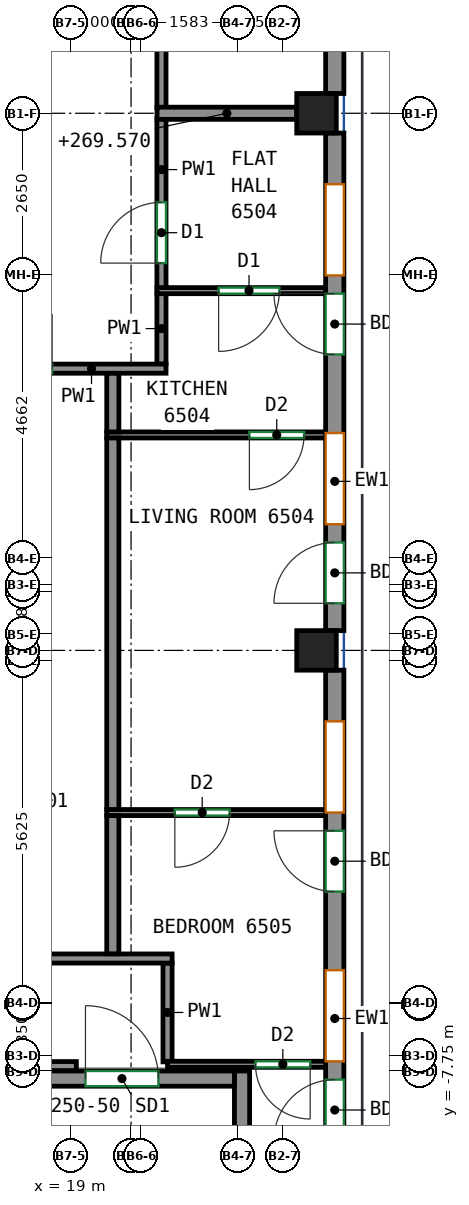
"""IFC4 building model, lengths in metres.
Left out: names, types, materials, properties, quantities, classifications, styles, units other than length and angle.
Written with IfcOpenShell. Run it as: python <this file> out.ifc"""

import sys

from ifc_helpers import new_model, si_unit, direction, frame, frame_2d, origin, origin_2d, place, context, subcontext, project, spatial, rectangle, extrude, source, transform, mapped, element, fill, save


model = new_model("IFC4")
c1 = context("Model", 3, precision=1e-05, world=origin(), true_north=direction((0.0, 1.0)))
c2 = subcontext(c1, "Body", "Model", "MODEL_VIEW")
j1 = project(units=[si_unit("LENGTHUNIT", "METRE"), si_unit("PLANEANGLEUNIT", "RADIAN")], contexts=[c1])
p1 = place(None, origin())
s1 = spatial("IfcSite", under=j1, at=p1, CompositionType="ELEMENT")
p2 = place(p1, origin())
s2 = spatial("IfcBuilding", under=s1, at=p2, CompositionType="ELEMENT")
p3 = place(p2, frame((0.0, 0.0, 267.0)))
s3 = spatial("IfcBuildingStorey", under=s2, at=p3, CompositionType="ELEMENT", Elevation=267.0)
m1 = source(origin(), c2, "Body", "SweptSolid", [
    extrude(rectangle(XDim=0.65, YDim=0.65, at=origin_2d()), origin(), (0.0, 0.0, 1.0), 3.12),
])
for number, where, z_axis, x_axis in (
    (1, (23.05, -0.833, 0.0), (0.0, 0.0, 1.0), (1.0, 0.0, 0.0)),
    (2, (23.05, 8.0, 0.0), (0.0, 0.0, 1.0), (1.0, 0.0, 0.0)),
):
    element("IfcColumn", number, at=place(p3, frame(where, z_axis=z_axis, x_axis=x_axis)), inside=s3, PredefinedType="COLUMN", context=c2, shape_type="MappedRepresentation", body=[
        mapped(m1, transform((0.0, 0.0, 0.0))),
    ])
m2 = source(origin(), c2, "Body", "SweptSolid", [
    extrude(rectangle(XDim=8.0, YDim=0.25, at=frame_2d((4.0, 0.0))), origin(), (0.0, 0.0, 1.0), 3.12),
])
p4 = place(p3, frame((21.825, -15.75, 0.0), z_axis=(0.0, 0.0, 1.0), x_axis=(0.0, 1.0, 0.0)))
e3 = element("IfcWall", 3, at=p4, inside=s3, PredefinedType="SHEAR", context=c2, shape_type="MappedRepresentation", body=[
    mapped(m2, transform((0.0, 0.0, 0.0))),
])
m3 = source(origin(), c2, "Body", "SweptSolid", [
    extrude(rectangle(XDim=3.7, YDim=0.25, at=frame_2d((1.85, 0.0))), origin(), (0.0, 0.0, 1.0), 3.12),
])
p5 = place(p3, frame((18.0, -7.875, 0.0), z_axis=(0.0, 0.0, 1.0), x_axis=(1.0, 0.0, 0.0)))
e4 = element("IfcWall", 4, at=p5, inside=s3, PredefinedType="SHEAR", context=c2, shape_type="MappedRepresentation", body=[
    mapped(m3, transform((0.0, 0.0, 0.0))),
])
p6 = place(p5, frame((1.25, 0.0, 0.0)))
e5 = element("IfcOpeningElement", 5, at=p6, cuts=e4, PredefinedType="OPENING", context=c2, shape_type="SweptSolid", body=[
    extrude(rectangle(XDim=1.2, YDim=2.1, at=frame_2d((0.6, 1.05))), frame((0.0, 0.135, 0.0), z_axis=(0.0, -1.0, 0.0), x_axis=(1.0, 0.0, 0.0)), (0.0, 0.0, 1.0), 0.27),
])
m4 = source(origin(), c2, "Body", "SweptSolid", [
    extrude(rectangle(XDim=8.184, YDim=0.3, at=frame_2d((4.092, 0.0))), origin(), (0.0, 0.0, 1.0), 3.12),
])
p7 = place(p3, frame((23.35, -9.342, 0.0), z_axis=(0.0, 0.0, 1.0), x_axis=(0.0, 1.0, 0.0)))
e6 = element("IfcWall", 6, at=p7, inside=s3, PredefinedType="SOLIDWALL", context=c2, shape_type="MappedRepresentation", body=[
    mapped(m4, transform((0.0, 0.0, 0.0))),
])
p8 = place(p7, frame((1.75, 0.0, 0.8)))
e7 = element("IfcOpeningElement", 7, at=p8, cuts=e6, PredefinedType="OPENING", context=c2, shape_type="SweptSolid", body=[
    extrude(rectangle(XDim=1.5, YDim=2.05, at=frame_2d((0.75, 1.025))), frame((0.0, 0.16, 0.0), z_axis=(0.0, -1.0, 0.0), x_axis=(1.0, 0.0, 0.0)), (0.0, 0.0, 1.0), 0.32),
])
p9 = place(p7, frame((0.45, 0.0, 0.0)))
e8 = element("IfcOpeningElement", 8, at=p9, cuts=e6, PredefinedType="OPENING", context=c2, shape_type="SweptSolid", body=[
    extrude(rectangle(XDim=1.0, YDim=2.1, at=frame_2d((0.5, 1.05))), frame((0.0, 0.16, 0.0), z_axis=(0.0, -1.0, 0.0), x_axis=(1.0, 0.0, 0.0)), (0.0, 0.0, 1.0), 0.32),
])
p10 = place(p7, frame((5.842, 0.0, 0.8)))
e9 = element("IfcOpeningElement", 9, at=p10, cuts=e6, PredefinedType="OPENING", context=c2, shape_type="SweptSolid", body=[
    extrude(rectangle(XDim=1.5, YDim=2.05, at=frame_2d((0.75, 1.025))), frame((0.0, 0.16, 0.0), z_axis=(0.0, -1.0, 0.0), x_axis=(1.0, 0.0, 0.0)), (0.0, 0.0, 1.0), 0.32),
])
p11 = place(p7, frame((4.542, 0.0, 0.0)))
e10 = element("IfcOpeningElement", 10, at=p11, cuts=e6, PredefinedType="OPENING", context=c2, shape_type="SweptSolid", body=[
    extrude(rectangle(XDim=1.0, YDim=2.1, at=frame_2d((0.5, 1.05))), frame((0.0, 0.16, 0.0), z_axis=(0.0, -1.0, 0.0), x_axis=(1.0, 0.0, 0.0)), (0.0, 0.0, 1.0), 0.32),
])
m5 = source(origin(), c2, "Body", "SweptSolid", [
    extrude(rectangle(XDim=8.183, YDim=0.3, at=frame_2d((4.092, 0.0))), origin(), (0.0, 0.0, 1.0), 3.12),
])
p12 = place(p3, frame((23.35, -0.508, 0.0), z_axis=(0.0, 0.0, 1.0), x_axis=(0.0, 1.0, 0.0)))
e11 = element("IfcWall", 11, at=p12, inside=s3, PredefinedType="SOLIDWALL", context=c2, shape_type="MappedRepresentation", body=[
    mapped(m5, transform((0.0, 0.0, 0.0))),
])
p13 = place(p12, frame((1.75, 0.0, 0.8)))
e12 = element("IfcOpeningElement", 12, at=p13, cuts=e11, PredefinedType="OPENING", context=c2, shape_type="SweptSolid", body=[
    extrude(rectangle(XDim=1.5, YDim=2.05, at=frame_2d((0.75, 1.025))), frame((0.0, 0.16, 0.0), z_axis=(0.0, -1.0, 0.0), x_axis=(1.0, 0.0, 0.0)), (0.0, 0.0, 1.0), 0.32),
])
p14 = place(p12, frame((0.45, 0.0, 0.0)))
e13 = element("IfcOpeningElement", 13, at=p14, cuts=e11, PredefinedType="OPENING", context=c2, shape_type="SweptSolid", body=[
    extrude(rectangle(XDim=1.0, YDim=2.1, at=frame_2d((0.5, 1.05))), frame((0.0, 0.16, 0.0), z_axis=(0.0, -1.0, 0.0), x_axis=(1.0, 0.0, 0.0)), (0.0, 0.0, 1.0), 0.32),
])
p15 = place(p12, frame((5.842, 0.0, 0.8)))
e14 = element("IfcOpeningElement", 14, at=p15, cuts=e11, PredefinedType="OPENING", context=c2, shape_type="SweptSolid", body=[
    extrude(rectangle(XDim=1.5, YDim=2.05, at=frame_2d((0.75, 1.025))), frame((0.0, 0.16, 0.0), z_axis=(0.0, -1.0, 0.0), x_axis=(1.0, 0.0, 0.0)), (0.0, 0.0, 1.0), 0.32),
])
p16 = place(p12, frame((4.542, 0.0, 0.0)))
e15 = element("IfcOpeningElement", 15, at=p16, cuts=e11, PredefinedType="OPENING", context=c2, shape_type="SweptSolid", body=[
    extrude(rectangle(XDim=1.0, YDim=2.1, at=frame_2d((0.5, 1.05))), frame((0.0, 0.16, 0.0), z_axis=(0.0, -1.0, 0.0), x_axis=(1.0, 0.0, 0.0)), (0.0, 0.0, 1.0), 0.32),
])
m6 = source(origin(), c2, "Body", "SweptSolid", [
    extrude(rectangle(XDim=13.35, YDim=0.3, at=frame_2d((6.675, 0.0))), origin(), (0.0, 0.0, 1.0), 3.12),
])
p17 = place(p3, frame((23.35, 8.325, 0.0), z_axis=(0.0, 0.0, 1.0), x_axis=(0.0, 1.0, 0.0)))
e16 = element("IfcWall", 16, at=p17, inside=s3, PredefinedType="SOLIDWALL", context=c2, shape_type="MappedRepresentation", body=[
    mapped(m6, transform((0.0, 0.0, 0.0))),
])
p18 = place(p17, frame((0.919, 0.0, 0.8)))
e17 = element("IfcOpeningElement", 17, at=p18, cuts=e16, PredefinedType="OPENING", context=c2, shape_type="SweptSolid", body=[
    extrude(rectangle(XDim=1.5, YDim=2.05, at=frame_2d((0.75, 1.025))), frame((0.0, 0.16, 0.0), z_axis=(0.0, -1.0, 0.0), x_axis=(1.0, 0.0, 0.0)), (0.0, 0.0, 1.0), 0.32),
])
p19 = place(p17, frame((4.256, 0.0, 0.8)))
e18 = element("IfcOpeningElement", 18, at=p19, cuts=e16, PredefinedType="OPENING", context=c2, shape_type="SweptSolid", body=[
    extrude(rectangle(XDim=1.5, YDim=2.05, at=frame_2d((0.75, 1.025))), frame((0.0, 0.16, 0.0), z_axis=(0.0, -1.0, 0.0), x_axis=(1.0, 0.0, 0.0)), (0.0, 0.0, 1.0), 0.32),
])
p20 = place(p17, frame((7.594, 0.0, 0.8)))
e19 = element("IfcOpeningElement", 19, at=p20, cuts=e16, PredefinedType="OPENING", context=c2, shape_type="SweptSolid", body=[
    extrude(rectangle(XDim=1.5, YDim=2.05, at=frame_2d((0.75, 1.025))), frame((0.0, 0.16, 0.0), z_axis=(0.0, -1.0, 0.0), x_axis=(1.0, 0.0, 0.0)), (0.0, 0.0, 1.0), 0.32),
])
p21 = place(p17, frame((10.931, 0.0, 0.8)))
e20 = element("IfcOpeningElement", 20, at=p21, cuts=e16, PredefinedType="OPENING", context=c2, shape_type="SweptSolid", body=[
    extrude(rectangle(XDim=1.5, YDim=2.05, at=frame_2d((0.75, 1.025))), frame((0.0, 0.16, 0.0), z_axis=(0.0, -1.0, 0.0), x_axis=(1.0, 0.0, 0.0)), (0.0, 0.0, 1.0), 0.32),
])
p22 = place(p3, frame((15.23, -7.67, 0.0), z_axis=(0.0, 0.0, 1.0), x_axis=(1.0, 0.0, 0.0)))
e21 = element("IfcWall", 21, at=p22, inside=s3, PredefinedType="PARTITIONING", context=c2, shape_type="SweptSolid", body=[
    extrude(rectangle(XDim=3.87, YDim=0.15, at=frame_2d((1.935, 0.0))), origin(), (0.0, 0.0, 1.0), 3.12),
])
p23 = place(p3, frame((20.6, -7.6, 0.0), z_axis=(0.0, 0.0, 1.0), x_axis=(0.0, 1.0, 0.0)))
e22 = element("IfcWall", 22, at=p23, inside=s3, PredefinedType="PARTITIONING", context=c2, shape_type="SweptSolid", body=[
    extrude(rectangle(XDim=1.625, YDim=0.15, at=frame_2d((0.812, 0.0))), origin(), (0.0, 0.0, 1.0), 3.12),
])
p24 = place(p3, frame((20.5, 3.875, 0.0), z_axis=(0.0, 0.0, 1.0), x_axis=(0.0, 1.0, 0.0)))
e23 = element("IfcWall", 23, at=p24, inside=s3, PredefinedType="PARTITIONING", context=c2, shape_type="SweptSolid", body=[
    extrude(rectangle(XDim=1.168, YDim=0.15, at=frame_2d((0.584, 0.0))), origin(), (0.0, 0.0, 1.0), 3.12),
])
p25 = place(p3, frame((20.5, 5.123, 0.0), z_axis=(0.0, 0.0, 1.0), x_axis=(0.0, 1.0, 0.0)))
e24 = element("IfcWall", 24, at=p25, inside=s3, PredefinedType="PARTITIONING", context=c2, shape_type="SweptSolid", body=[
    extrude(rectangle(XDim=2.787, YDim=0.15, at=frame_2d((1.394, 0.0))), origin(), (0.0, 0.0, 1.0), 3.12),
])
p26 = place(p25, frame((0.413, 0.0, 0.0)))
e25 = element("IfcOpeningElement", 25, at=p26, cuts=e24, PredefinedType="OPENING", context=c2, shape_type="SweptSolid", body=[
    extrude(rectangle(XDim=1.0, YDim=2.1, at=frame_2d((0.5, 1.05))), frame((0.0, 0.085, 0.0), z_axis=(0.0, -1.0, 0.0), x_axis=(1.0, 0.0, 0.0)), (0.0, 0.0, 1.0), 0.17),
])
p27 = place(p3, frame((20.5, 8.09, 0.0), z_axis=(0.0, 0.0, 1.0), x_axis=(0.0, 1.0, 0.0)))
e26 = element("IfcWall", 26, at=p27, inside=s3, PredefinedType="PARTITIONING", context=c2, shape_type="SweptSolid", body=[
    extrude(rectangle(XDim=15.01, YDim=0.15, at=frame_2d((7.505, 0.0))), origin(), (0.0, 0.0, 1.0), 3.12),
])
p28 = place(p27, frame((7.505, 0.0, 0.0)))
e27 = element("IfcOpeningElement", 27, at=p28, cuts=e26, PredefinedType="OPENING", context=c2, shape_type="SweptSolid", body=[
    extrude(rectangle(XDim=0.9, YDim=2.1, at=frame_2d((0.45, 1.05))), frame((0.0, 0.085, 0.0), z_axis=(0.0, -1.0, 0.0), x_axis=(1.0, 0.0, 0.0)), (0.0, 0.0, 1.0), 0.17),
])
p29 = place(p3, frame((8.305, -5.9, 0.0), z_axis=(0.0, 0.0, 1.0), x_axis=(1.0, 0.0, 0.0)))
e28 = element("IfcWall", 28, at=p29, inside=s3, PredefinedType="PARTITIONING", context=c2, shape_type="SweptSolid", body=[
    extrude(rectangle(XDim=12.37, YDim=0.15, at=frame_2d((6.185, 0.0))), origin(), (0.0, 0.0, 1.0), 3.12),
])
p30 = place(p29, frame((6.004, 0.0, 0.0)))
e29 = element("IfcOpeningElement", 29, at=p30, cuts=e28, PredefinedType="OPENING", context=c2, shape_type="SweptSolid", body=[
    extrude(rectangle(XDim=0.9, YDim=2.1, at=frame_2d((0.45, 1.05))), frame((0.0, 0.085, 0.0), z_axis=(0.0, -1.0, 0.0), x_axis=(1.0, 0.0, 0.0)), (0.0, 0.0, 1.0), 0.17),
])
p31 = place(p3, frame((16.49, 3.8, 0.0), z_axis=(0.0, 0.0, 1.0), x_axis=(1.0, 0.0, 0.0)))
e30 = element("IfcWall", 30, at=p31, inside=s3, PredefinedType="PARTITIONING", context=c2, shape_type="SweptSolid", body=[
    extrude(rectangle(XDim=4.085, YDim=0.15, at=frame_2d((2.042, 0.0))), origin(), (0.0, 0.0, 1.0), 3.12),
])
p32 = place(p31, frame((1.312, 0.0, 0.0)))
e31 = element("IfcOpeningElement", 31, at=p32, cuts=e30, PredefinedType="OPENING", context=c2, shape_type="SweptSolid", body=[
    extrude(rectangle(XDim=0.9, YDim=2.1, at=frame_2d((0.45, 1.05))), frame((0.0, 0.085, 0.0), z_axis=(0.0, -1.0, 0.0), x_axis=(1.0, 0.0, 0.0)), (0.0, 0.0, 1.0), 0.17),
])
p33 = place(p3, frame((23.25, -7.64, 0.0), z_axis=(0.0, 0.0, 1.0), x_axis=(-1.0, 0.0, 0.0)))
e32 = element("IfcWall", 32, at=p33, inside=s3, PredefinedType="PARTITIONING", context=c2, shape_type="SweptSolid", body=[
    extrude(rectangle(XDim=2.65, YDim=0.1, at=frame_2d((1.325, 0.0))), origin(), (0.0, 0.0, 1.0), 3.12),
])
p34 = place(p33, frame((0.304, 0.0, 0.0)))
e33 = element("IfcOpeningElement", 33, at=p34, cuts=e32, PredefinedType="OPENING", context=c2, shape_type="SweptSolid", body=[
    extrude(rectangle(XDim=0.9, YDim=2.1, at=frame_2d((0.45, 1.05))), frame((0.0, 0.06, 0.0), z_axis=(0.0, -1.0, 0.0), x_axis=(1.0, 0.0, 0.0)), (0.0, 0.0, 1.0), 0.12),
])
p35 = place(p3, frame((23.25, -3.5, 0.0), z_axis=(0.0, 0.0, 1.0), x_axis=(-1.0, 0.0, 0.0)))
e34 = element("IfcWall", 34, at=p35, inside=s3, PredefinedType="PARTITIONING", context=c2, shape_type="SweptSolid", body=[
    extrude(rectangle(XDim=3.65, YDim=0.1, at=frame_2d((1.825, 0.0))), origin(), (0.0, 0.0, 1.0), 3.12),
])
p36 = place(p35, frame((1.63, 0.0, 0.0)))
e35 = element("IfcOpeningElement", 35, at=p36, cuts=e34, PredefinedType="OPENING", context=c2, shape_type="SweptSolid", body=[
    extrude(rectangle(XDim=0.9, YDim=2.1, at=frame_2d((0.45, 1.05))), frame((0.0, 0.06, 0.0), z_axis=(0.0, -1.0, 0.0), x_axis=(1.0, 0.0, 0.0)), (0.0, 0.0, 1.0), 0.12),
])
p37 = place(p3, frame((19.7, -5.823, 0.0), z_axis=(0.0, 0.0, 1.0), x_axis=(0.0, 1.0, 0.0)))
e36 = element("IfcWall", 36, at=p37, inside=s3, PredefinedType="PARTITIONING", context=c2, shape_type="SweptSolid", body=[
    extrude(rectangle(XDim=2.273, YDim=0.2, at=frame_2d((1.136, 0.0))), origin(), (0.0, 0.0, 1.0), 3.12),
])
p38 = place(p3, frame((23.25, 2.71, 0.0), z_axis=(0.0, 0.0, 1.0), x_axis=(-1.0, 0.0, 0.0)))
e37 = element("IfcWall", 37, at=p38, inside=s3, PredefinedType="PARTITIONING", context=c2, shape_type="SweptSolid", body=[
    extrude(rectangle(XDim=3.65, YDim=0.1, at=frame_2d((1.825, 0.0))), origin(), (0.0, 0.0, 1.0), 3.12),
])
p39 = place(p38, frame((0.404, 0.0, 0.0)))
e38 = element("IfcOpeningElement", 38, at=p39, cuts=e37, PredefinedType="OPENING", context=c2, shape_type="SweptSolid", body=[
    extrude(rectangle(XDim=0.9, YDim=2.1, at=frame_2d((0.45, 1.05))), frame((0.0, 0.06, 0.0), z_axis=(0.0, -1.0, 0.0), x_axis=(1.0, 0.0, 0.0)), (0.0, 0.0, 1.0), 0.12),
])
p40 = place(p3, frame((19.7, -3.45, 0.0), z_axis=(0.0, 0.0, 1.0), x_axis=(0.0, 1.0, 0.0)))
e39 = element("IfcWall", 39, at=p40, inside=s3, PredefinedType="PARTITIONING", context=c2, shape_type="SweptSolid", body=[
    extrude(rectangle(XDim=6.11, YDim=0.2, at=frame_2d((3.055, 0.0))), origin(), (0.0, 0.0, 1.0), 3.12),
])
p41 = place(p3, frame((23.25, 5.083, 0.0), z_axis=(0.0, 0.0, 1.0), x_axis=(-1.0, 0.0, 0.0)))
e40 = element("IfcWall", 40, at=p41, inside=s3, PredefinedType="PARTITIONING", context=c2, shape_type="SweptSolid", body=[
    extrude(rectangle(XDim=2.823, YDim=0.1, at=frame_2d((1.412, 0.0))), origin(), (0.0, 0.0, 1.0), 3.12),
])
p42 = place(p41, frame((0.81, 0.0, 0.0)))
e41 = element("IfcOpeningElement", 41, at=p42, cuts=e40, PredefinedType="OPENING", context=c2, shape_type="SweptSolid", body=[
    extrude(rectangle(XDim=1.0, YDim=2.1, at=frame_2d((0.5, 1.05))), frame((0.0, 0.06, 0.0), z_axis=(0.0, -1.0, 0.0), x_axis=(1.0, 0.0, 0.0)), (0.0, 0.0, 1.0), 0.12),
])
p43 = place(p3, frame((19.7, 2.76, 0.0), z_axis=(0.0, 0.0, 1.0), x_axis=(0.0, 1.0, 0.0)))
e42 = element("IfcWall", 42, at=p43, inside=s3, PredefinedType="PARTITIONING", context=c2, shape_type="SweptSolid", body=[
    extrude(rectangle(XDim=0.963, YDim=0.2, at=frame_2d((0.481, 0.0))), origin(), (0.0, 0.0, 1.0), 3.12),
])
p44 = place(p3, frame((20.427, 8.0, 0.0), z_axis=(0.0, 0.0, 1.0), x_axis=(1.0, 0.0, 0.0)))
e43 = element("IfcWall", 43, at=p44, inside=s3, PredefinedType="PARTITIONING", context=c2, shape_type="SweptSolid", body=[
    extrude(rectangle(XDim=2.298, YDim=0.2, at=frame_2d((1.149, 0.0))), origin(), (0.0, 0.0, 1.0), 2.57),
])
p45 = place(p8, origin())
e44 = element("IfcWindow", 44, at=p45, inside=s3, PartitioningType="SINGLE_PANEL", PredefinedType="WINDOW", context=c2, shape_type="SweptSolid", body=[
    extrude(rectangle(XDim=1.5, YDim=2.05, at=frame_2d((0.75, 1.025))), frame((0.0, 0.03, 0.0), z_axis=(0.0, -1.0, 0.0), x_axis=(1.0, 0.0, 0.0)), (0.0, 0.0, 1.0), 0.06),
])
fill(e7, e44)
p46 = place(p9, origin())
e45 = element("IfcDoor", 45, at=p46, inside=s3, OperationType="SINGLE_SWING_LEFT", PredefinedType="DOOR", context=c2, shape_type="SweptSolid", body=[
    extrude(rectangle(XDim=1.0, YDim=2.1, at=frame_2d((0.5, 1.05))), frame((0.0, 0.025, 0.0), z_axis=(0.0, -1.0, 0.0), x_axis=(1.0, 0.0, 0.0)), (0.0, 0.0, 1.0), 0.05),
])
fill(e8, e45)
p47 = place(p10, origin())
e46 = element("IfcWindow", 46, at=p47, inside=s3, PartitioningType="SINGLE_PANEL", PredefinedType="WINDOW", context=c2, shape_type="SweptSolid", body=[
    extrude(rectangle(XDim=1.5, YDim=2.05, at=frame_2d((0.75, 1.025))), frame((0.0, 0.03, 0.0), z_axis=(0.0, -1.0, 0.0), x_axis=(1.0, 0.0, 0.0)), (0.0, 0.0, 1.0), 0.06),
])
fill(e9, e46)
p48 = place(p11, origin())
e47 = element("IfcDoor", 47, at=p48, inside=s3, OperationType="SINGLE_SWING_RIGHT", PredefinedType="DOOR", context=c2, shape_type="SweptSolid", body=[
    extrude(rectangle(XDim=1.0, YDim=2.1, at=frame_2d((0.5, 1.05))), frame((0.0, 0.025, 0.0), z_axis=(0.0, -1.0, 0.0), x_axis=(1.0, 0.0, 0.0)), (0.0, 0.0, 1.0), 0.05),
])
fill(e10, e47)
p49 = place(p13, origin())
e48 = element("IfcWindow", 48, at=p49, inside=s3, PartitioningType="SINGLE_PANEL", PredefinedType="WINDOW", context=c2, shape_type="SweptSolid", body=[
    extrude(rectangle(XDim=1.5, YDim=2.05, at=frame_2d((0.75, 1.025))), frame((0.0, 0.03, 0.0), z_axis=(0.0, -1.0, 0.0), x_axis=(1.0, 0.0, 0.0)), (0.0, 0.0, 1.0), 0.06),
])
fill(e12, e48)
p50 = place(p14, origin())
e49 = element("IfcDoor", 49, at=p50, inside=s3, OperationType="SINGLE_SWING_LEFT", PredefinedType="DOOR", context=c2, shape_type="SweptSolid", body=[
    extrude(rectangle(XDim=1.0, YDim=2.1, at=frame_2d((0.5, 1.05))), frame((0.0, 0.025, 0.0), z_axis=(0.0, -1.0, 0.0), x_axis=(1.0, 0.0, 0.0)), (0.0, 0.0, 1.0), 0.05),
])
fill(e13, e49)
p51 = place(p15, origin())
e50 = element("IfcWindow", 50, at=p51, inside=s3, PartitioningType="SINGLE_PANEL", PredefinedType="WINDOW", context=c2, shape_type="SweptSolid", body=[
    extrude(rectangle(XDim=1.5, YDim=2.05, at=frame_2d((0.75, 1.025))), frame((0.0, 0.03, 0.0), z_axis=(0.0, -1.0, 0.0), x_axis=(1.0, 0.0, 0.0)), (0.0, 0.0, 1.0), 0.06),
])
fill(e14, e50)
p52 = place(p16, origin())
e51 = element("IfcDoor", 51, at=p52, inside=s3, OperationType="SINGLE_SWING_RIGHT", PredefinedType="DOOR", context=c2, shape_type="SweptSolid", body=[
    extrude(rectangle(XDim=1.0, YDim=2.1, at=frame_2d((0.5, 1.05))), frame((0.0, 0.025, 0.0), z_axis=(0.0, -1.0, 0.0), x_axis=(1.0, 0.0, 0.0)), (0.0, 0.0, 1.0), 0.05),
])
fill(e15, e51)
p53 = place(p6, origin())
e52 = element("IfcDoor", 52, at=p53, inside=s3, OperationType="DOUBLE_DOOR_SINGLE_SWING", PredefinedType="DOOR", context=c2, shape_type="SweptSolid", body=[
    extrude(rectangle(XDim=1.2, YDim=2.1, at=frame_2d((0.6, 1.05))), frame((0.0, 0.025, 0.0), z_axis=(0.0, -1.0, 0.0), x_axis=(1.0, 0.0, 0.0)), (0.0, 0.0, 1.0), 0.05),
])
fill(e5, e52)
p54 = place(p34, origin())
e53 = element("IfcDoor", 53, at=p54, inside=s3, OperationType="SINGLE_SWING_LEFT", PredefinedType="DOOR", context=c2, shape_type="SweptSolid", body=[
    extrude(rectangle(XDim=0.9, YDim=2.1, at=frame_2d((0.45, 1.05))), frame((0.0, 0.025, 0.0), z_axis=(0.0, -1.0, 0.0), x_axis=(1.0, 0.0, 0.0)), (0.0, 0.0, 1.0), 0.05),
])
fill(e33, e53)
p55 = place(p36, origin())
e54 = element("IfcDoor", 54, at=p55, inside=s3, OperationType="SINGLE_SWING_RIGHT", PredefinedType="DOOR", context=c2, shape_type="SweptSolid", body=[
    extrude(rectangle(XDim=0.9, YDim=2.1, at=frame_2d((0.45, 1.05))), frame((0.0, 0.025, 0.0), z_axis=(0.0, -1.0, 0.0), x_axis=(1.0, 0.0, 0.0)), (0.0, 0.0, 1.0), 0.05),
])
fill(e35, e54)
p56 = place(p39, origin())
e55 = element("IfcDoor", 55, at=p56, inside=s3, OperationType="SINGLE_SWING_RIGHT", PredefinedType="DOOR", context=c2, shape_type="SweptSolid", body=[
    extrude(rectangle(XDim=0.9, YDim=2.1, at=frame_2d((0.45, 1.05))), frame((0.0, 0.025, 0.0), z_axis=(0.0, -1.0, 0.0), x_axis=(1.0, 0.0, 0.0)), (0.0, 0.0, 1.0), 0.05),
])
fill(e38, e55)
p57 = place(p32, origin())
e56 = element("IfcDoor", 56, at=p57, inside=s3, OperationType="SINGLE_SWING_RIGHT", PredefinedType="DOOR", context=c2, shape_type="SweptSolid", body=[
    extrude(rectangle(XDim=0.9, YDim=2.1, at=frame_2d((0.45, 1.05))), frame((0.0, 0.025, 0.0), z_axis=(0.0, -1.0, 0.0), x_axis=(1.0, 0.0, 0.0)), (0.0, 0.0, 1.0), 0.05),
])
fill(e31, e56)
p58 = place(p42, origin())
e57 = element("IfcDoor", 57, at=p58, inside=s3, OperationType="SINGLE_SWING_RIGHT", PredefinedType="DOOR", context=c2, shape_type="SweptSolid", body=[
    extrude(rectangle(XDim=1.0, YDim=2.1, at=frame_2d((0.5, 1.05))), frame((0.0, 0.025, 0.0), z_axis=(0.0, -1.0, 0.0), x_axis=(1.0, 0.0, 0.0)), (0.0, 0.0, 1.0), 0.05),
])
fill(e41, e57)
p59 = place(p26, origin())
e58 = element("IfcDoor", 58, at=p59, inside=s3, OperationType="SINGLE_SWING_LEFT", PredefinedType="DOOR", context=c2, shape_type="SweptSolid", body=[
    extrude(rectangle(XDim=1.0, YDim=2.1, at=frame_2d((0.5, 1.05))), frame((0.0, 0.025, 0.0), z_axis=(0.0, -1.0, 0.0), x_axis=(1.0, 0.0, 0.0)), (0.0, 0.0, 1.0), 0.05),
])
fill(e25, e58)
save(model, sys.argv[1])
